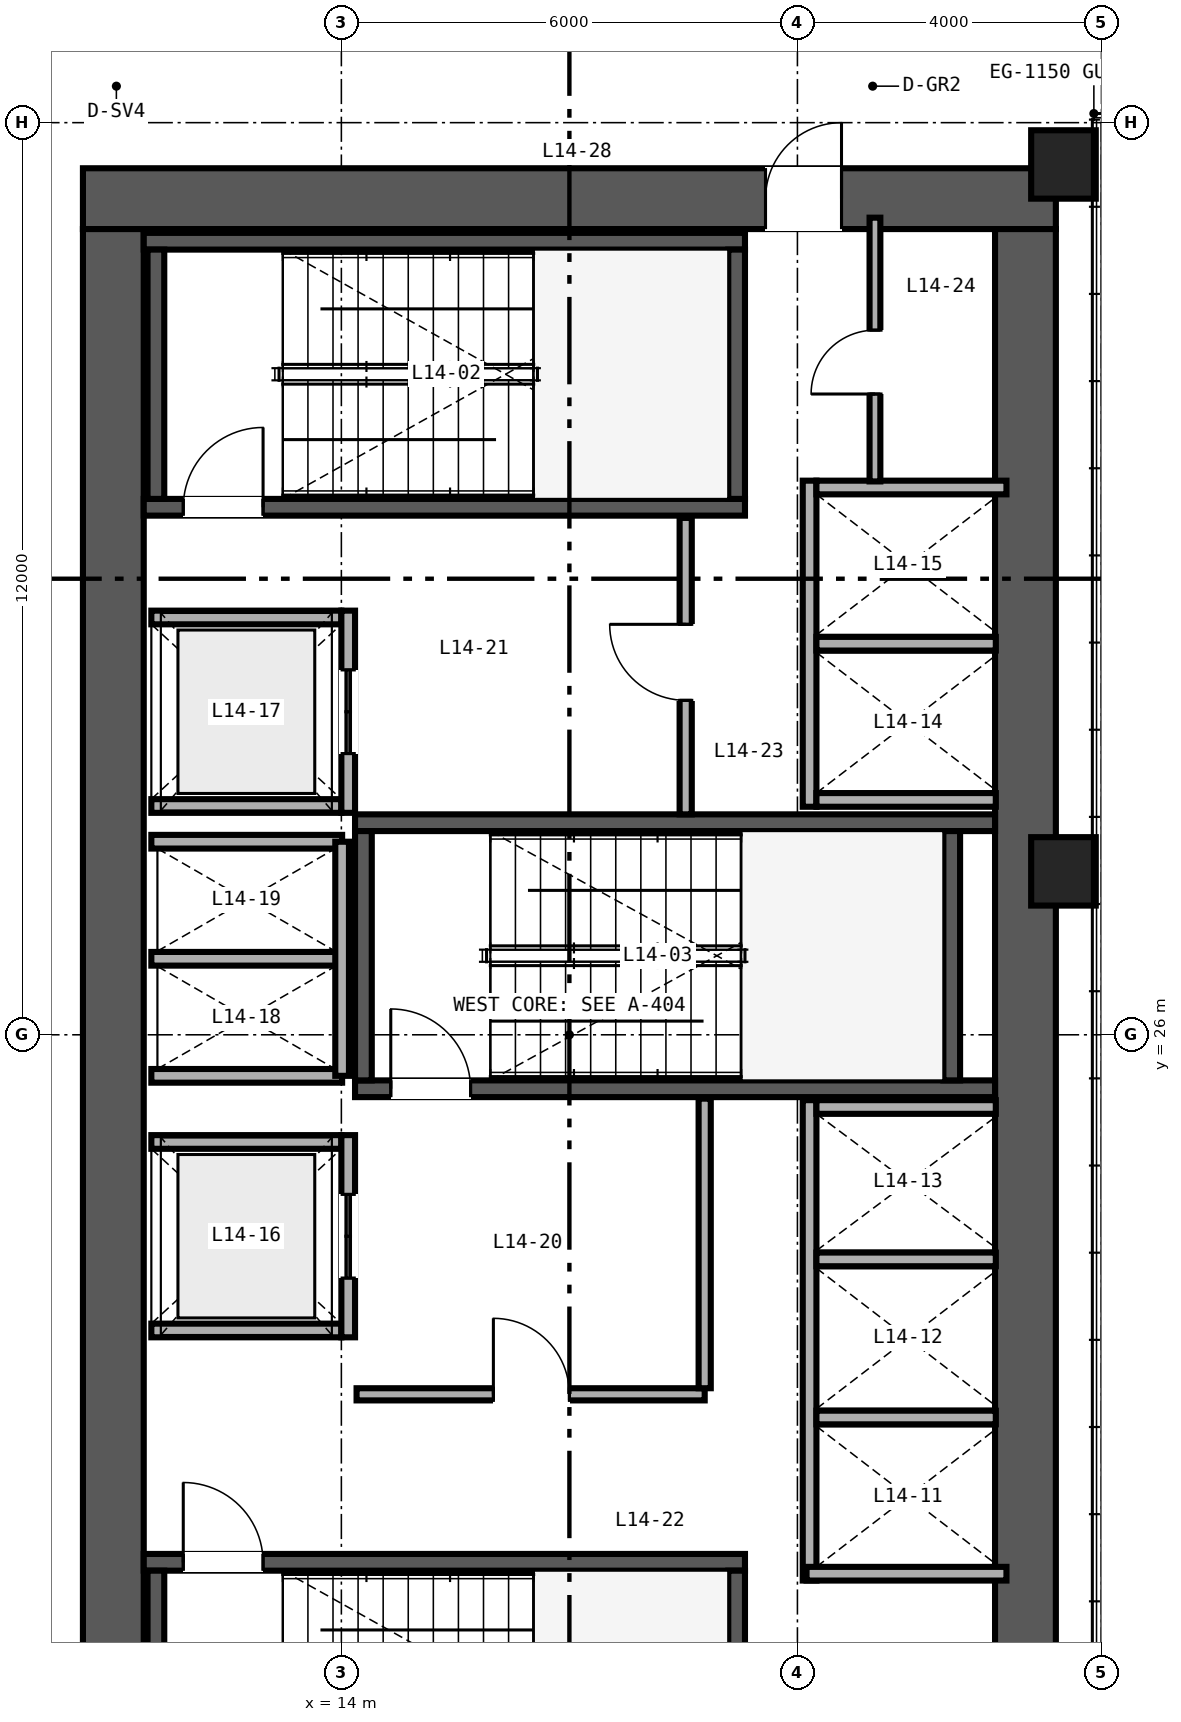
"""IFC4 building model, lengths in metres.
Left out: names, types, materials, properties, quantities, classifications, styles, units other than length and angle.
Written with IfcOpenShell. Run it as: python <this file> out.ifc"""

import sys

from ifc_helpers import new_model, si_unit, direction, frame, frame_2d, origin, origin_2d, place, context, subcontext, project, spatial, rectangle, hollow_rectangle, extrude, source, transform, mapped, element, fill, save


model = new_model("IFC4")
c1 = context("Model", 3, precision=1e-05, world=origin(), true_north=direction((0.0, 1.0)))
c2 = subcontext(c1, "Body", "Model", "MODEL_VIEW")
j1 = project(units=[si_unit("LENGTHUNIT", "METRE"), si_unit("PLANEANGLEUNIT", "RADIAN")], contexts=[c1])
p1 = place(None, origin())
s1 = spatial("IfcSite", under=j1, at=p1, CompositionType="ELEMENT")
p2 = place(p1, origin())
s2 = spatial("IfcBuilding", under=s1, at=p2, CompositionType="ELEMENT")
p3 = place(p2, frame((0.0, 0.0, 60.0)))
s3 = spatial("IfcBuildingStorey", under=s2, at=p3, CompositionType="ELEMENT", Elevation=60.0)
p4 = place(p3, frame((10.6, 37.0, 0.0), z_axis=(0.0, 0.0, 1.0), x_axis=(1.0, 0.0, 0.0)))
e1 = element("IfcWall", 1, at=p4, inside=s3, PredefinedType="SHEAR", context=c2, shape_type="SweptSolid", body=[
    extrude(rectangle(XDim=12.8, YDim=0.8, at=frame_2d((6.4, 0.0))), origin(), (0.0, 0.0, 1.0), 3.35),
])
p5 = place(p4, frame((8.98, 0.0, 0.0)))
e2 = element("IfcOpeningElement", 2, at=p5, cuts=e1, PredefinedType="OPENING", context=c2, shape_type="SweptSolid", body=[
    extrude(rectangle(XDim=1.0, YDim=2.15, at=frame_2d((0.5, 1.075))), frame((0.0, 0.41, 0.0), z_axis=(0.0, -1.0, 0.0), x_axis=(1.0, 0.0, 0.0)), (0.0, 0.0, 1.0), 0.82),
])
for number, where, z_axis, x_axis in (
    (3, (11.0, 15.4, 0.0), (0.0, 0.0, 1.0), (0.0, 1.0, 0.0)),
    (4, (23.0, 15.4, 0.0), (0.0, 0.0, 1.0), (0.0, 1.0, 0.0)),
):
    element("IfcWall", number, at=place(p3, frame(where, z_axis=z_axis, x_axis=x_axis)), inside=s3, PredefinedType="SHEAR", context=c2, shape_type="SweptSolid", body=[
        extrude(rectangle(XDim=21.2, YDim=0.8, at=frame_2d((10.6, 0.0))), origin(), (0.0, 0.0, 1.0), 3.35),
    ])
p6 = place(p3, frame((11.4, 19.06, 0.0), z_axis=(0.0, 0.0, 1.0), x_axis=(1.0, 0.0, 0.0)))
e5 = element("IfcWall", 5, at=p6, inside=s3, PredefinedType="SHEAR", context=c2, shape_type="SweptSolid", body=[
    extrude(rectangle(XDim=7.91, YDim=0.22, at=frame_2d((3.955, 0.0))), origin(), (0.0, 0.0, 1.0), 3.4),
])
p7 = place(p6, frame((0.52, 0.0, 0.0)))
e6 = element("IfcOpeningElement", 6, at=p7, cuts=e5, PredefinedType="OPENING", context=c2, shape_type="SweptSolid", body=[
    extrude(rectangle(XDim=1.05, YDim=2.15, at=frame_2d((0.525, 1.075))), frame((0.0, 0.12, 0.0), z_axis=(0.0, -1.0, 0.0), x_axis=(1.0, 0.0, 0.0)), (0.0, 0.0, 1.0), 0.24),
])
for number, where, z_axis, x_axis in (
    (7, (11.56, 15.67, 0.0), (0.0, 0.0, 1.0), (0.0, 1.0, 0.0)),
    (8, (19.2, 15.67, 0.0), (0.0, 0.0, 1.0), (0.0, 1.0, 0.0)),
):
    element("IfcWall", number, at=place(p3, frame(where, z_axis=z_axis, x_axis=x_axis)), inside=s3, PredefinedType="SHEAR", context=c2, shape_type="SweptSolid", body=[
        extrude(rectangle(XDim=3.28, YDim=0.22, at=frame_2d((1.64, 0.0))), origin(), (0.0, 0.0, 1.0), 3.4),
    ])
p8 = place(p3, frame((11.4, 32.94, 0.0), z_axis=(0.0, 0.0, 1.0), x_axis=(1.0, 0.0, 0.0)))
e9 = element("IfcWall", 9, at=p8, inside=s3, PredefinedType="SHEAR", context=c2, shape_type="SweptSolid", body=[
    extrude(rectangle(XDim=7.91, YDim=0.22, at=frame_2d((3.955, 0.0))), origin(), (0.0, 0.0, 1.0), 3.4),
])
p9 = place(p8, frame((0.52, 0.0, 0.0)))
e10 = element("IfcOpeningElement", 10, at=p9, cuts=e9, PredefinedType="OPENING", context=c2, shape_type="SweptSolid", body=[
    extrude(rectangle(XDim=1.05, YDim=2.15, at=frame_2d((0.525, 1.075))), frame((0.0, 0.12, 0.0), z_axis=(0.0, -1.0, 0.0), x_axis=(1.0, 0.0, 0.0)), (0.0, 0.0, 1.0), 0.24),
])
p10 = place(p3, frame((11.4, 36.44, 0.0), z_axis=(0.0, 0.0, 1.0), x_axis=(1.0, 0.0, 0.0)))
e11 = element("IfcWall", 11, at=p10, inside=s3, PredefinedType="SHEAR", context=c2, shape_type="SweptSolid", body=[
    extrude(rectangle(XDim=7.91, YDim=0.22, at=frame_2d((3.955, 0.0))), origin(), (0.0, 0.0, 1.0), 3.4),
])
for number, where, z_axis, x_axis in (
    (12, (11.56, 33.05, 0.0), (0.0, 0.0, 1.0), (0.0, 1.0, 0.0)),
    (13, (19.2, 33.05, 0.0), (0.0, 0.0, 1.0), (0.0, 1.0, 0.0)),
):
    element("IfcWall", number, at=place(p3, frame(where, z_axis=z_axis, x_axis=x_axis)), inside=s3, PredefinedType="SHEAR", context=c2, shape_type="SweptSolid", body=[
        extrude(rectangle(XDim=3.28, YDim=0.22, at=frame_2d((1.64, 0.0))), origin(), (0.0, 0.0, 1.0), 3.4),
    ])
p11 = place(p3, frame((14.18, 25.29, 0.0), z_axis=(0.0, 0.0, 1.0), x_axis=(1.0, 0.0, 0.0)))
e14 = element("IfcWall", 14, at=p11, inside=s3, PredefinedType="SHEAR", context=c2, shape_type="SweptSolid", body=[
    extrude(rectangle(XDim=8.42, YDim=0.22, at=frame_2d((4.21, 0.0))), origin(), (0.0, 0.0, 1.0), 3.4),
])
p12 = place(p11, frame((0.47, 0.0, 0.0)))
e15 = element("IfcOpeningElement", 15, at=p12, cuts=e14, PredefinedType="OPENING", context=c2, shape_type="SweptSolid", body=[
    extrude(rectangle(XDim=1.05, YDim=2.15, at=frame_2d((0.525, 1.075))), frame((0.0, 0.12, 0.0), z_axis=(0.0, -1.0, 0.0), x_axis=(1.0, 0.0, 0.0)), (0.0, 0.0, 1.0), 0.24),
])
p13 = place(p3, frame((14.18, 28.79, 0.0), z_axis=(0.0, 0.0, 1.0), x_axis=(1.0, 0.0, 0.0)))
e16 = element("IfcWall", 16, at=p13, inside=s3, PredefinedType="SHEAR", context=c2, shape_type="SweptSolid", body=[
    extrude(rectangle(XDim=8.42, YDim=0.22, at=frame_2d((4.21, 0.0))), origin(), (0.0, 0.0, 1.0), 3.4),
])
for number, where, z_axis, x_axis in (
    (17, (14.29, 25.4, 0.0), (0.0, 0.0, 1.0), (0.0, 1.0, 0.0)),
    (18, (22.03, 25.4, 0.0), (0.0, 0.0, 1.0), (0.0, 1.0, 0.0)),
):
    element("IfcWall", number, at=place(p3, frame(where, z_axis=z_axis, x_axis=x_axis)), inside=s3, PredefinedType="SHEAR", context=c2, shape_type="SweptSolid", body=[
        extrude(rectangle(XDim=3.28, YDim=0.22, at=frame_2d((1.64, 0.0))), origin(), (0.0, 0.0, 1.0), 3.4),
    ])
m1 = source(origin(), c2, "Body", "SweptSolid", [
    extrude(hollow_rectangle(XDim=0.85, YDim=0.9, WallThickness=0.04, at=origin_2d()), origin(), (0.0, 0.0, 1.0), 3.35),
])
for number, where, z_axis, x_axis in (
    (19, (23.5, 28.15, 0.0), (0.0, 0.0, 1.0), (1.0, 0.0, 0.0)),
    (20, (23.5, 37.45, 0.0), (0.0, 0.0, 1.0), (1.0, 0.0, 0.0)),
):
    element("IfcColumn", number, at=place(p3, frame(where, z_axis=z_axis, x_axis=x_axis)), inside=s3, PredefinedType="COLUMN", context=c2, shape_type="MappedRepresentation", body=[
        mapped(m1, transform((0.0, 0.0, 0.0), scale=1.0)),
    ])
p14 = place(p3, frame((20.16, 18.82, 0.0), z_axis=(0.0, 0.0, 1.0), x_axis=(0.0, 1.0, 0.0)))
e21 = element("IfcWall", 21, at=p14, inside=s3, PredefinedType="SOLIDWALL", context=c2, shape_type="SweptSolid", body=[
    extrude(rectangle(XDim=6.32, YDim=0.18, at=frame_2d((3.16, 0.0))), origin(), (0.0, 0.0, 1.0), 2.36),
])
p15 = place(p3, frame((20.12, 18.91, 0.0), z_axis=(0.0, 0.0, 1.0), x_axis=(1.0, 0.0, 0.0)))
e22 = element("IfcWall", 22, at=p15, inside=s3, PredefinedType="SOLIDWALL", context=c2, shape_type="SweptSolid", body=[
    extrude(rectangle(XDim=2.63, YDim=0.18, at=frame_2d((1.315, 0.0))), origin(), (0.0, 0.0, 1.0), 3.35),
])
p16 = place(p3, frame((20.25, 25.05, 0.0), z_axis=(0.0, 0.0, 1.0), x_axis=(1.0, 0.0, 0.0)))
e23 = element("IfcWall", 23, at=p16, inside=s3, PredefinedType="SOLIDWALL", context=c2, shape_type="SweptSolid", body=[
    extrude(rectangle(XDim=2.36, YDim=0.18, at=frame_2d((1.18, 0.0))), origin(), (0.0, 0.0, 1.0), 3.35),
])
p17 = place(p3, frame((20.25, 20.965, 0.0), z_axis=(0.0, 0.0, 1.0), x_axis=(1.0, 0.0, 0.0)))
e24 = element("IfcWall", 24, at=p17, inside=s3, PredefinedType="SOLIDWALL", context=c2, shape_type="SweptSolid", body=[
    extrude(rectangle(XDim=2.36, YDim=0.18, at=frame_2d((1.18, 0.0))), origin(), (0.0, 0.0, 1.0), 2.36),
])
p18 = place(p3, frame((20.25, 23.045, 0.0), z_axis=(0.0, 0.0, 1.0), x_axis=(1.0, 0.0, 0.0)))
e25 = element("IfcWall", 25, at=p18, inside=s3, PredefinedType="SOLIDWALL", context=c2, shape_type="SweptSolid", body=[
    extrude(rectangle(XDim=2.36, YDim=0.18, at=frame_2d((1.18, 0.0))), origin(), (0.0, 0.0, 1.0), 3.35),
])
p19 = place(p3, frame((20.16, 29.0, 0.0), z_axis=(0.0, 0.0, 1.0), x_axis=(0.0, 1.0, 0.0)))
e26 = element("IfcWall", 26, at=p19, inside=s3, PredefinedType="SOLIDWALL", context=c2, shape_type="SweptSolid", body=[
    extrude(rectangle(XDim=4.29, YDim=0.18, at=frame_2d((2.145, 0.0))), origin(), (0.0, 0.0, 1.0), 3.35),
])
p20 = place(p3, frame((20.25, 29.09, 0.0), z_axis=(0.0, 0.0, 1.0), x_axis=(1.0, 0.0, 0.0)))
e27 = element("IfcWall", 27, at=p20, inside=s3, PredefinedType="SOLIDWALL", context=c2, shape_type="SweptSolid", body=[
    extrude(rectangle(XDim=2.36, YDim=0.18, at=frame_2d((1.18, 0.0))), origin(), (0.0, 0.0, 1.0), 3.35),
])
p21 = place(p3, frame((20.25, 33.2, 0.0), z_axis=(0.0, 0.0, 1.0), x_axis=(1.0, 0.0, 0.0)))
e28 = element("IfcWall", 28, at=p21, inside=s3, PredefinedType="SOLIDWALL", context=c2, shape_type="SweptSolid", body=[
    extrude(rectangle(XDim=2.5, YDim=0.18, at=frame_2d((1.25, 0.0))), origin(), (0.0, 0.0, 1.0), 3.35),
])
p22 = place(p3, frame((20.25, 31.145, 0.0), z_axis=(0.0, 0.0, 1.0), x_axis=(1.0, 0.0, 0.0)))
e29 = element("IfcWall", 29, at=p22, inside=s3, PredefinedType="SOLIDWALL", context=c2, shape_type="SweptSolid", body=[
    extrude(rectangle(XDim=2.36, YDim=0.18, at=frame_2d((1.18, 0.0))), origin(), (0.0, 0.0, 1.0), 3.35),
])
for number, where, z_axis, x_axis in (
    (30, (11.5, 22.11, 0.0), (0.0, 0.0, 1.0), (1.0, 0.0, 0.0)),
    (31, (11.5, 24.59, 0.0), (0.0, 0.0, 1.0), (1.0, 0.0, 0.0)),
):
    element("IfcWall", number, at=place(p3, frame(where, z_axis=z_axis, x_axis=x_axis)), inside=s3, PredefinedType="SOLIDWALL", context=c2, shape_type="SweptSolid", body=[
        extrude(rectangle(XDim=2.5, YDim=0.18, at=frame_2d((1.25, 0.0))), origin(), (0.0, 0.0, 1.0), 3.35),
    ])
p23 = place(p3, frame((14.09, 22.02, 0.0), z_axis=(0.0, 0.0, 1.0), x_axis=(0.0, 1.0, 0.0)))
e32 = element("IfcWall", 32, at=p23, inside=s3, PredefinedType="SOLIDWALL", context=c2, shape_type="SweptSolid", body=[
    extrude(rectangle(XDim=2.66, YDim=0.18, at=frame_2d((1.33, 0.0))), origin(), (0.0, 0.0, 1.0), 3.35),
])
p24 = place(p23, frame((0.78, 0.0, 0.0)))
e33 = element("IfcOpeningElement", 33, at=p24, cuts=e32, PredefinedType="OPENING", context=c2, shape_type="SweptSolid", body=[
    extrude(rectangle(XDim=1.1, YDim=2.2, at=frame_2d((0.55, 1.1))), frame((0.0, 0.1, 0.0), z_axis=(0.0, -1.0, 0.0), x_axis=(1.0, 0.0, 0.0)), (0.0, 0.0, 1.0), 0.2),
])
for number, where, z_axis, x_axis in (
    (34, (11.5, 29.01, 0.0), (0.0, 0.0, 1.0), (1.0, 0.0, 0.0)),
    (35, (11.5, 31.49, 0.0), (0.0, 0.0, 1.0), (1.0, 0.0, 0.0)),
):
    element("IfcWall", number, at=place(p3, frame(where, z_axis=z_axis, x_axis=x_axis)), inside=s3, PredefinedType="SOLIDWALL", context=c2, shape_type="SweptSolid", body=[
        extrude(rectangle(XDim=2.5, YDim=0.18, at=frame_2d((1.25, 0.0))), origin(), (0.0, 0.0, 1.0), 3.35),
    ])
p25 = place(p3, frame((14.09, 28.92, 0.0), z_axis=(0.0, 0.0, 1.0), x_axis=(0.0, 1.0, 0.0)))
e36 = element("IfcWall", 36, at=p25, inside=s3, PredefinedType="SOLIDWALL", context=c2, shape_type="SweptSolid", body=[
    extrude(rectangle(XDim=2.66, YDim=0.18, at=frame_2d((1.33, 0.0))), origin(), (0.0, 0.0, 1.0), 3.35),
])
p26 = place(p25, frame((0.78, 0.0, 0.0)))
e37 = element("IfcOpeningElement", 37, at=p26, cuts=e36, PredefinedType="OPENING", context=c2, shape_type="SweptSolid", body=[
    extrude(rectangle(XDim=1.1, YDim=2.2, at=frame_2d((0.55, 1.1))), frame((0.0, 0.1, 0.0), z_axis=(0.0, -1.0, 0.0), x_axis=(1.0, 0.0, 0.0)), (0.0, 0.0, 1.0), 0.2),
])
for number, where, z_axis, x_axis in (
    (38, (11.5, 25.46, 0.0), (0.0, 0.0, 1.0), (1.0, 0.0, 0.0)),
    (39, (11.5, 27.0, 0.0), (0.0, 0.0, 1.0), (1.0, 0.0, 0.0)),
    (40, (11.5, 28.54, 0.0), (0.0, 0.0, 1.0), (1.0, 0.0, 0.0)),
):
    element("IfcWall", number, at=place(p3, frame(where, z_axis=z_axis, x_axis=x_axis)), inside=s3, PredefinedType="SOLIDWALL", context=c2, shape_type="SweptSolid", body=[
        extrude(rectangle(XDim=2.51, YDim=0.18, at=frame_2d((1.255, 0.0))), origin(), (0.0, 0.0, 1.0), 3.35),
    ])
p27 = place(p3, frame((14.01, 25.46, 0.0), z_axis=(0.0, 0.0, 1.0), x_axis=(0.0, 1.0, 0.0)))
e41 = element("IfcWall", 41, at=p27, inside=s3, PredefinedType="SOLIDWALL", context=c2, shape_type="SweptSolid", body=[
    extrude(rectangle(XDim=3.08, YDim=0.18, at=frame_2d((1.54, 0.0))), origin(), (0.0, 0.0, 1.0), 3.35),
])
p28 = place(p3, frame((14.2, 21.27, 0.0), z_axis=(0.0, 0.0, 1.0), x_axis=(1.0, 0.0, 0.0)))
e42 = element("IfcWall", 42, at=p28, inside=s3, PredefinedType="PARTITIONING", context=c2, shape_type="SweptSolid", body=[
    extrude(rectangle(XDim=4.58, YDim=0.16, at=frame_2d((2.29, 0.0))), origin(), (0.0, 0.0, 1.0), 3.35),
])
p29 = place(p28, frame((1.8, 0.0, 0.0)))
e43 = element("IfcOpeningElement", 43, at=p29, cuts=e42, PredefinedType="OPENING", context=c2, shape_type="SweptSolid", body=[
    extrude(rectangle(XDim=1.0, YDim=2.15, at=frame_2d((0.5, 1.075))), frame((0.0, 0.09, 0.0), z_axis=(0.0, -1.0, 0.0), x_axis=(1.0, 0.0, 0.0)), (0.0, 0.0, 1.0), 0.18),
])
p30 = place(p3, frame((18.78, 21.35, 0.0), z_axis=(0.0, 0.0, 1.0), x_axis=(0.0, 1.0, 0.0)))
e44 = element("IfcWall", 44, at=p30, inside=s3, PredefinedType="PARTITIONING", context=c2, shape_type="SweptSolid", body=[
    extrude(rectangle(XDim=3.81, YDim=0.16, at=frame_2d((1.905, 0.0))), origin(), (0.0, 0.0, 1.0), 3.35),
])
p31 = place(p3, frame((18.53, 28.9, 0.0), z_axis=(0.0, 0.0, 1.0), x_axis=(0.0, 1.0, 0.0)))
e45 = element("IfcWall", 45, at=p31, inside=s3, PredefinedType="PARTITIONING", context=c2, shape_type="SweptSolid", body=[
    extrude(rectangle(XDim=3.9, YDim=0.16, at=frame_2d((1.95, 0.0))), origin(), (0.0, 0.0, 1.0), 3.35),
])
p32 = place(p31, frame((1.5, 0.0, 0.0)))
e46 = element("IfcOpeningElement", 46, at=p32, cuts=e45, PredefinedType="OPENING", context=c2, shape_type="SweptSolid", body=[
    extrude(rectangle(XDim=1.0, YDim=2.15, at=frame_2d((0.5, 1.075))), frame((0.0, 0.09, 0.0), z_axis=(0.0, -1.0, 0.0), x_axis=(1.0, 0.0, 0.0)), (0.0, 0.0, 1.0), 0.18),
])
p33 = place(p3, frame((21.02, 33.28, 0.0), z_axis=(0.0, 0.0, 1.0), x_axis=(0.0, 1.0, 0.0)))
e47 = element("IfcWall", 47, at=p33, inside=s3, PredefinedType="PARTITIONING", context=c2, shape_type="SweptSolid", body=[
    extrude(rectangle(XDim=3.47, YDim=0.142, at=frame_2d((1.735, 0.0))), origin(), (0.0, 0.0, 1.0), 3.35),
])
p34 = place(p33, frame((1.15, 0.0, 0.0)))
e48 = element("IfcOpeningElement", 48, at=p34, cuts=e47, PredefinedType="OPENING", context=c2, shape_type="SweptSolid", body=[
    extrude(rectangle(XDim=0.84, YDim=2.1, at=frame_2d((0.42, 1.05))), frame((0.0, 0.081, 0.0), z_axis=(0.0, -1.0, 0.0), x_axis=(1.0, 0.0, 0.0)), (0.0, 0.0, 1.0), 0.162),
])
m2 = source(origin(), c2, "Body", "SweptSolid", [
    extrude(rectangle(XDim=1.05, YDim=2.15, at=frame_2d((0.525, 1.075))), frame((0.0, 0.025, 0.0), z_axis=(0.0, -1.0, 0.0), x_axis=(1.0, 0.0, 0.0)), (0.0, 0.0, 1.0), 0.05),
])
p35 = place(p7, origin())
e49 = element("IfcDoor", 49, at=p35, inside=s3, OperationType="SINGLE_SWING_LEFT", PredefinedType="DOOR", context=c2, shape_type="MappedRepresentation", body=[
    mapped(m2, transform((0.0, 0.0, 0.0), scale=1.0)),
])
fill(e6, e49)
p36 = place(p9, origin())
e50 = element("IfcDoor", 50, at=p36, inside=s3, OperationType="SINGLE_SWING_RIGHT", PredefinedType="DOOR", context=c2, shape_type="MappedRepresentation", body=[
    mapped(m2, transform((0.0, 0.0, 0.0), scale=1.0)),
])
fill(e10, e50)
p37 = place(p12, origin())
e51 = element("IfcDoor", 51, at=p37, inside=s3, OperationType="SINGLE_SWING_LEFT", PredefinedType="DOOR", context=c2, shape_type="MappedRepresentation", body=[
    mapped(m2, transform((0.0, 0.0, 0.0), scale=1.0)),
])
fill(e15, e51)
m3 = source(origin(), c2, "Body", "SweptSolid", [
    extrude(rectangle(XDim=1.1, YDim=2.2, at=frame_2d((0.55, 1.1))), frame((0.0, 0.025, 0.0), z_axis=(0.0, -1.0, 0.0), x_axis=(1.0, 0.0, 0.0)), (0.0, 0.0, 1.0), 0.05),
])
p38 = place(p24, origin())
e52 = element("IfcDoor", 52, at=p38, inside=s3, OperationType="DOUBLE_DOOR_SLIDING", PredefinedType="DOOR", context=c2, shape_type="MappedRepresentation", body=[
    mapped(m3, transform((0.0, 0.0, 0.0), scale=1.0)),
])
fill(e33, e52)
p39 = place(p26, origin())
e53 = element("IfcDoor", 53, at=p39, inside=s3, OperationType="DOUBLE_DOOR_SLIDING", PredefinedType="DOOR", context=c2, shape_type="MappedRepresentation", body=[
    mapped(m3, transform((0.0, 0.0, 0.0), scale=1.0)),
])
fill(e37, e53)
m4 = source(origin(), c2, "Body", "SweptSolid", [
    extrude(rectangle(XDim=1.0, YDim=2.15, at=frame_2d((0.5, 1.075))), frame((0.0, 0.025, 0.0), z_axis=(0.0, -1.0, 0.0), x_axis=(1.0, 0.0, 0.0)), (0.0, 0.0, 1.0), 0.05),
])
p40 = place(p29, origin())
e54 = element("IfcDoor", 54, at=p40, inside=s3, OperationType="SINGLE_SWING_LEFT", PredefinedType="DOOR", context=c2, shape_type="MappedRepresentation", body=[
    mapped(m4, transform((0.0, 0.0, 0.0), scale=1.0)),
])
fill(e43, e54)
p41 = place(p32, origin())
e55 = element("IfcDoor", 55, at=p41, inside=s3, OperationType="SINGLE_SWING_RIGHT", PredefinedType="DOOR", context=c2, shape_type="MappedRepresentation", body=[
    mapped(m4, transform((0.0, 0.0, 0.0), scale=1.0)),
])
fill(e46, e55)
m5 = source(origin(), c2, "Body", "SweptSolid", [
    extrude(rectangle(XDim=0.84, YDim=2.1, at=frame_2d((0.42, 1.05))), frame((0.0, 0.025, 0.0), z_axis=(0.0, -1.0, 0.0), x_axis=(1.0, 0.0, 0.0)), (0.0, 0.0, 1.0), 0.05),
])
p42 = place(p34, origin())
e56 = element("IfcDoor", 56, at=p42, inside=s3, OperationType="SINGLE_SWING_LEFT", PredefinedType="DOOR", context=c2, shape_type="MappedRepresentation", body=[
    mapped(m5, transform((0.0, 0.0, 0.0), scale=1.0)),
])
fill(e48, e56)
p43 = place(p5, origin())
e57 = element("IfcDoor", 57, at=p43, inside=s3, OperationType="SINGLE_SWING_RIGHT", PredefinedType="DOOR", context=c2, shape_type="MappedRepresentation", body=[
    mapped(m4, transform((0.0, 0.0, 0.0), scale=1.0)),
])
fill(e2, e57)
save(model, sys.argv[1])
